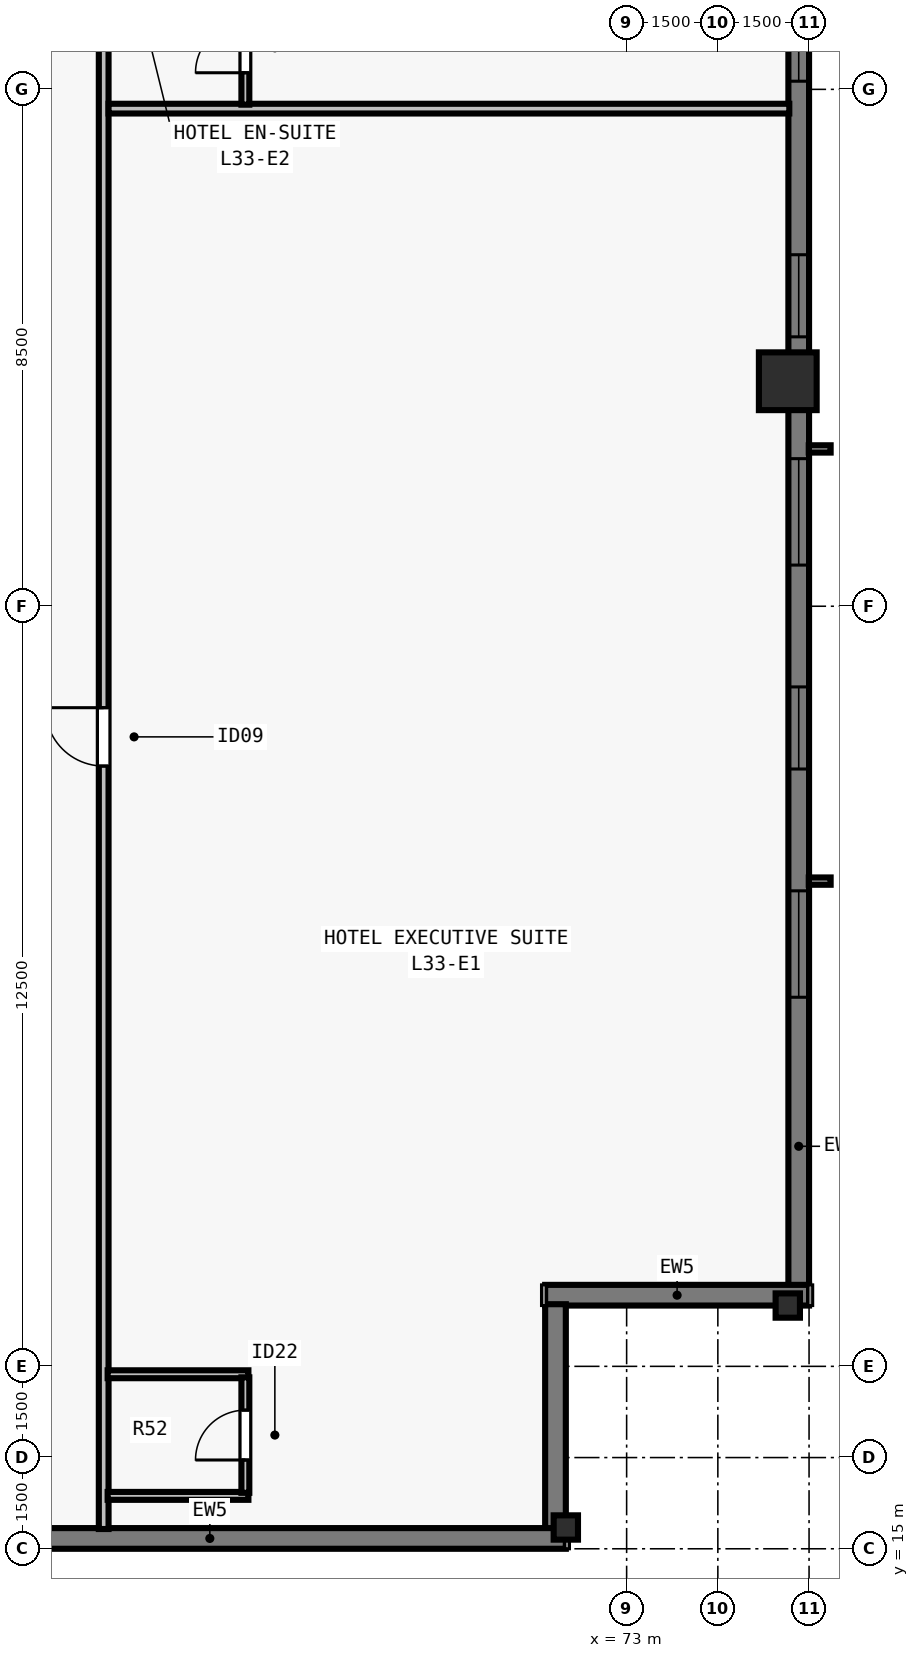
"""IFC4 building model, lengths in metres.
Left out: names, types, materials, properties, quantities, classifications, styles, units other than length and angle.
Written with IfcOpenShell. Run it as: python <this file> out.ifc"""

import sys

from ifc_helpers import new_model, si_unit, direction, frame, frame_2d, origin, origin_2d, place, context, subcontext, project, spatial, rectangle, i_section, extrude, element, fill, save


model = new_model("IFC4")
c1 = context("Model", 3, precision=1e-05, world=origin(), true_north=direction((0.0, 1.0)))
c2 = subcontext(c1, "Body", "Model", "MODEL_VIEW")
j1 = project(units=[si_unit("LENGTHUNIT", "METRE"), si_unit("PLANEANGLEUNIT", "RADIAN")], contexts=[c1])
p1 = place(None, origin())
s1 = spatial("IfcSite", under=j1, at=p1, CompositionType="ELEMENT")
p2 = place(p1, origin())
s2 = spatial("IfcBuilding", under=s1, at=p2, CompositionType="ELEMENT")
p3 = place(p2, frame((0.0, 0.0, 123.5)))
s3 = spatial("IfcBuildingStorey", under=s2, at=p3, CompositionType="ELEMENT", Elevation=123.5)
for number, where, z_axis, x_axis in (
    (1, (72.0, 15.35, 0.0), (0.0, 0.0, 1.0), (1.0, 0.0, 0.0)),
    (2, (75.65, 19.0, 0.0), (0.0, 0.0, 1.0), (0.0, 1.0, 0.0)),
):
    element("IfcColumn", number, at=place(p3, frame(where, z_axis=z_axis, x_axis=x_axis)), inside=s3, PredefinedType="COLUMN", context=c2, shape_type="SweptSolid", body=[
        extrude(i_section(OverallWidth=0.4, OverallDepth=0.4, WebThickness=0.022, FlangeThickness=0.036, at=origin_2d()), origin(), (0.0, 0.0, 1.0), 3.5),
    ])
p4 = place(p3, frame((75.65, 34.2, 0.0), z_axis=(0.0, 0.0, 1.0), x_axis=(0.0, 1.0, 0.0)))
e3 = element("IfcColumn", 3, at=p4, inside=s3, PredefinedType="COLUMN", context=c2, shape_type="SweptSolid", body=[
    extrude(rectangle(XDim=0.95, YDim=0.95, at=origin_2d()), origin(), (0.0, 0.0, 1.0), 3.5),
])
p5 = place(p3, frame((75.83, 59.0, 0.0), z_axis=(0.0, 0.0, 1.0), x_axis=(0.0, -1.0, 0.0)))
e4 = element("IfcWall", 4, at=p5, inside=s3, PredefinedType="SOLIDWALL", context=c2, shape_type="SweptSolid", body=[
    extrude(rectangle(XDim=39.682, YDim=0.34, at=frame_2d((19.841, 0.0))), origin(), (0.0, 0.0, 1.0), 3.28),
])
p6 = place(p5, frame((4.752, 0.0, 0.8)))
e5 = element("IfcOpeningElement", 5, at=p6, cuts=e4, PredefinedType="OPENING", context=c2, shape_type="SweptSolid", body=[
    extrude(rectangle(XDim=1.75, YDim=1.66, at=frame_2d((0.875, 0.83))), frame((0.0, 0.18, 0.0), z_axis=(0.0, -1.0, 0.0), x_axis=(1.0, 0.0, 0.0)), (0.0, 0.0, 1.0), 0.36),
])
p7 = place(p5, frame((8.505, 0.0, 0.8)))
e6 = element("IfcOpeningElement", 6, at=p7, cuts=e4, PredefinedType="OPENING", context=c2, shape_type="SweptSolid", body=[
    extrude(rectangle(XDim=1.35, YDim=1.66, at=frame_2d((0.675, 0.83))), frame((0.0, 0.18, 0.0), z_axis=(0.0, -1.0, 0.0), x_axis=(1.0, 0.0, 0.0)), (0.0, 0.0, 1.0), 0.36),
])
p8 = place(p5, frame((11.859, 0.0, 0.8)))
e7 = element("IfcOpeningElement", 7, at=p8, cuts=e4, PredefinedType="OPENING", context=c2, shape_type="SweptSolid", body=[
    extrude(rectangle(XDim=1.75, YDim=1.66, at=frame_2d((0.875, 0.83))), frame((0.0, 0.18, 0.0), z_axis=(0.0, -1.0, 0.0), x_axis=(1.0, 0.0, 0.0)), (0.0, 0.0, 1.0), 0.36),
])
p9 = place(p5, frame((16.062, 0.0, 0.8)))
e8 = element("IfcOpeningElement", 8, at=p9, cuts=e4, PredefinedType="OPENING", context=c2, shape_type="SweptSolid", body=[
    extrude(rectangle(XDim=1.35, YDim=1.66, at=frame_2d((0.675, 0.83))), frame((0.0, 0.18, 0.0), z_axis=(0.0, -1.0, 0.0), x_axis=(1.0, 0.0, 0.0)), (0.0, 0.0, 1.0), 0.36),
])
p10 = place(p5, frame((18.116, 0.0, 0.8)))
e9 = element("IfcOpeningElement", 9, at=p10, cuts=e4, PredefinedType="OPENING", context=c2, shape_type="SweptSolid", body=[
    extrude(rectangle(XDim=1.75, YDim=1.66, at=frame_2d((0.875, 0.83))), frame((0.0, 0.18, 0.0), z_axis=(0.0, -1.0, 0.0), x_axis=(1.0, 0.0, 0.0)), (0.0, 0.0, 1.0), 0.36),
])
p11 = place(p5, frame((22.719, 0.0, 0.8)))
e10 = element("IfcOpeningElement", 10, at=p11, cuts=e4, PredefinedType="OPENING", context=c2, shape_type="SweptSolid", body=[
    extrude(rectangle(XDim=1.35, YDim=1.66, at=frame_2d((0.675, 0.83))), frame((0.0, 0.18, 0.0), z_axis=(0.0, -1.0, 0.0), x_axis=(1.0, 0.0, 0.0)), (0.0, 0.0, 1.0), 0.36),
])
p12 = place(p5, frame((26.073, 0.0, 0.8)))
e11 = element("IfcOpeningElement", 11, at=p12, cuts=e4, PredefinedType="OPENING", context=c2, shape_type="SweptSolid", body=[
    extrude(rectangle(XDim=1.75, YDim=1.66, at=frame_2d((0.875, 0.83))), frame((0.0, 0.18, 0.0), z_axis=(0.0, -1.0, 0.0), x_axis=(1.0, 0.0, 0.0)), (0.0, 0.0, 1.0), 0.36),
])
p13 = place(p5, frame((29.827, 0.0, 0.8)))
e12 = element("IfcOpeningElement", 12, at=p13, cuts=e4, PredefinedType="OPENING", context=c2, shape_type="SweptSolid", body=[
    extrude(rectangle(XDim=1.35, YDim=1.66, at=frame_2d((0.675, 0.83))), frame((0.0, 0.18, 0.0), z_axis=(0.0, -1.0, 0.0), x_axis=(1.0, 0.0, 0.0)), (0.0, 0.0, 1.0), 0.36),
])
p14 = place(p5, frame((33.18, 0.0, 0.8)))
e13 = element("IfcOpeningElement", 13, at=p14, cuts=e4, PredefinedType="OPENING", context=c2, shape_type="SweptSolid", body=[
    extrude(rectangle(XDim=1.75, YDim=1.66, at=frame_2d((0.875, 0.83))), frame((0.0, 0.18, 0.0), z_axis=(0.0, -1.0, 0.0), x_axis=(1.0, 0.0, 0.0)), (0.0, 0.0, 1.0), 0.36),
])
p15 = place(p3, frame((76.0, 19.17, 0.0), z_axis=(0.0, 0.0, 1.0), x_axis=(-1.0, 0.0, 0.0)))
e14 = element("IfcWall", 14, at=p15, inside=s3, PredefinedType="SOLIDWALL", context=c2, shape_type="SweptSolid", body=[
    extrude(rectangle(XDim=4.34, YDim=0.34, at=frame_2d((2.17, 0.0))), origin(), (0.0, 0.0, 1.0), 3.28),
])
p16 = place(p3, frame((71.83, 19.022, 0.0), z_axis=(0.0, 0.0, 1.0), x_axis=(0.0, -1.0, 0.0)))
e15 = element("IfcWall", 15, at=p16, inside=s3, PredefinedType="SOLIDWALL", context=c2, shape_type="SweptSolid", body=[
    extrude(rectangle(XDim=3.704, YDim=0.34, at=frame_2d((1.852, 0.0))), origin(), (0.0, 0.0, 1.0), 3.28),
])
p17 = place(p3, frame((72.0, 15.17, 0.0), z_axis=(0.0, 0.0, 1.0), x_axis=(-1.0, 0.0, 0.0)))
e16 = element("IfcWall", 16, at=p17, inside=s3, PredefinedType="SOLIDWALL", context=c2, shape_type="SweptSolid", body=[
    extrude(rectangle(XDim=39.682, YDim=0.34, at=frame_2d((19.841, 0.0))), origin(), (0.0, 0.0, 1.0), 3.28),
])
p18 = place(p17, frame((11.859, 0.0, 0.8)))
e17 = element("IfcOpeningElement", 17, at=p18, cuts=e16, PredefinedType="OPENING", context=c2, shape_type="SweptSolid", body=[
    extrude(rectangle(XDim=1.75, YDim=1.66, at=frame_2d((0.875, 0.83))), frame((0.0, 0.18, 0.0), z_axis=(0.0, -1.0, 0.0), x_axis=(1.0, 0.0, 0.0)), (0.0, 0.0, 1.0), 0.36),
])
p19 = place(p17, frame((16.062, 0.0, 0.8)))
e18 = element("IfcOpeningElement", 18, at=p19, cuts=e16, PredefinedType="OPENING", context=c2, shape_type="SweptSolid", body=[
    extrude(rectangle(XDim=1.35, YDim=1.66, at=frame_2d((0.675, 0.83))), frame((0.0, 0.18, 0.0), z_axis=(0.0, -1.0, 0.0), x_axis=(1.0, 0.0, 0.0)), (0.0, 0.0, 1.0), 0.36),
])
p20 = place(p17, frame((18.966, 0.0, 0.8)))
e19 = element("IfcOpeningElement", 19, at=p20, cuts=e16, PredefinedType="OPENING", context=c2, shape_type="SweptSolid", body=[
    extrude(rectangle(XDim=1.75, YDim=1.66, at=frame_2d((0.875, 0.83))), frame((0.0, 0.18, 0.0), z_axis=(0.0, -1.0, 0.0), x_axis=(1.0, 0.0, 0.0)), (0.0, 0.0, 1.0), 0.36),
])
p21 = place(p17, frame((21.469, 0.0, 0.8)))
e20 = element("IfcOpeningElement", 20, at=p21, cuts=e16, PredefinedType="OPENING", context=c2, shape_type="SweptSolid", body=[
    extrude(rectangle(XDim=1.35, YDim=1.66, at=frame_2d((0.675, 0.83))), frame((0.0, 0.18, 0.0), z_axis=(0.0, -1.0, 0.0), x_axis=(1.0, 0.0, 0.0)), (0.0, 0.0, 1.0), 0.36),
])
p22 = place(p17, frame((27.323, 0.0, 0.8)))
e21 = element("IfcOpeningElement", 21, at=p22, cuts=e16, PredefinedType="OPENING", context=c2, shape_type="SweptSolid", body=[
    extrude(rectangle(XDim=1.75, YDim=1.66, at=frame_2d((0.875, 0.83))), frame((0.0, 0.18, 0.0), z_axis=(0.0, -1.0, 0.0), x_axis=(1.0, 0.0, 0.0)), (0.0, 0.0, 1.0), 0.36),
])
p23 = place(p17, frame((29.827, 0.0, 0.8)))
e22 = element("IfcOpeningElement", 22, at=p23, cuts=e16, PredefinedType="OPENING", context=c2, shape_type="SweptSolid", body=[
    extrude(rectangle(XDim=1.35, YDim=1.66, at=frame_2d((0.675, 0.83))), frame((0.0, 0.18, 0.0), z_axis=(0.0, -1.0, 0.0), x_axis=(1.0, 0.0, 0.0)), (0.0, 0.0, 1.0), 0.36),
])
p24 = place(p17, frame((25.43, 0.0, 0.8)))
e23 = element("IfcOpeningElement", 23, at=p24, cuts=e16, PredefinedType="OPENING", context=c2, shape_type="SweptSolid", body=[
    extrude(rectangle(XDim=0.9, YDim=1.66, at=frame_2d((0.45, 0.83))), frame((0.0, 0.18, 0.0), z_axis=(0.0, -1.0, 0.0), x_axis=(1.0, 0.0, 0.0)), (0.0, 0.0, 1.0), 0.36),
])
p25 = place(p17, frame((34.39, 0.0, 0.8)))
e24 = element("IfcOpeningElement", 24, at=p25, cuts=e16, PredefinedType="OPENING", context=c2, shape_type="SweptSolid", body=[
    extrude(rectangle(XDim=0.9, YDim=1.66, at=frame_2d((0.45, 0.83))), frame((0.0, 0.18, 0.0), z_axis=(0.0, -1.0, 0.0), x_axis=(1.0, 0.0, 0.0)), (0.0, 0.0, 1.0), 0.36),
])
p26 = place(p3, frame((64.4, 15.325, 0.0), z_axis=(0.0, 0.0, 1.0), x_axis=(0.0, 1.0, 0.0)))
e25 = element("IfcWall", 25, at=p26, inside=s3, PredefinedType="PARTITIONING", context=c2, shape_type="SweptSolid", body=[
    extrude(rectangle(XDim=47.35, YDim=0.16, at=frame_2d((23.675, 0.0))), origin(), (0.0, 0.0, 1.0), 2.555),
])
p27 = place(p26, frame((12.547, 0.0, 0.0)))
e26 = element("IfcOpeningElement", 26, at=p27, cuts=e25, PredefinedType="OPENING", context=c2, shape_type="SweptSolid", body=[
    extrude(rectangle(XDim=0.96, YDim=2.15, at=frame_2d((0.48, 1.075))), frame((0.0, 0.09, 0.0), z_axis=(0.0, -1.0, 0.0), x_axis=(1.0, 0.0, 0.0)), (0.0, 0.0, 1.0), 0.18),
])
p28 = place(p26, frame((35.902, 0.0, 0.0)))
e27 = element("IfcOpeningElement", 27, at=p28, cuts=e25, PredefinedType="OPENING", context=c2, shape_type="SweptSolid", body=[
    extrude(rectangle(XDim=0.96, YDim=2.15, at=frame_2d((0.48, 1.075))), frame((0.0, 0.09, 0.0), z_axis=(0.0, -1.0, 0.0), x_axis=(1.0, 0.0, 0.0)), (0.0, 0.0, 1.0), 0.18),
])
for number, where, z_axis, x_axis in (
    (28, (64.465, 15.87, 0.0), (0.0, 0.0, 1.0), (1.0, 0.0, 0.0)),
    (29, (64.465, 17.87, 0.0), (0.0, 0.0, 1.0), (1.0, 0.0, 0.0)),
):
    element("IfcWall", number, at=place(p3, frame(where, z_axis=z_axis, x_axis=x_axis)), inside=s3, PredefinedType="PLUMBINGWALL", context=c2, shape_type="SweptSolid", body=[
        extrude(rectangle(XDim=2.315, YDim=0.13, at=frame_2d((1.157, 0.0))), origin(), (0.0, 0.0, 1.0), 3.28),
    ])
p29 = place(p3, frame((66.73, 15.92, 0.0), z_axis=(0.0, 0.0, 1.0), x_axis=(0.0, 1.0, 0.0)))
e30 = element("IfcWall", 30, at=p29, inside=s3, PredefinedType="PLUMBINGWALL", context=c2, shape_type="SweptSolid", body=[
    extrude(rectangle(XDim=1.9, YDim=0.13, at=frame_2d((0.95, 0.0))), origin(), (0.0, 0.0, 1.0), 3.28),
])
p30 = place(p29, frame((0.54, 0.0, 0.0)))
e31 = element("IfcOpeningElement", 31, at=p30, cuts=e30, PredefinedType="OPENING", context=c2, shape_type="SweptSolid", body=[
    extrude(rectangle(XDim=0.82, YDim=2.1, at=frame_2d((0.41, 1.05))), frame((0.0, 0.075, 0.0), z_axis=(0.0, -1.0, 0.0), x_axis=(1.0, 0.0, 0.0)), (0.0, 0.0, 1.0), 0.15),
])
p31 = place(p3, frame((64.48, 38.683, 0.0), z_axis=(0.0, 0.0, 1.0), x_axis=(1.0, 0.0, 0.0)))
e32 = element("IfcWall", 32, at=p31, inside=s3, PredefinedType="PARTITIONING", context=c2, shape_type="SweptSolid", body=[
    extrude(rectangle(XDim=11.195, YDim=0.16, at=frame_2d((5.598, 0.0))), origin(), (0.0, 0.0, 1.0), 3.28),
])
p32 = place(p3, frame((66.73, 38.748, 0.0), z_axis=(0.0, 0.0, 1.0), x_axis=(0.0, 1.0, 0.0)))
e33 = element("IfcWall", 33, at=p32, inside=s3, PredefinedType="PLUMBINGWALL", context=c2, shape_type="SweptSolid", body=[
    extrude(rectangle(XDim=1.885, YDim=0.13, at=frame_2d((0.942, 0.0))), origin(), (0.0, 0.0, 1.0), 3.28),
])
p33 = place(p32, frame((0.525, 0.0, 0.0)))
e34 = element("IfcOpeningElement", 34, at=p33, cuts=e33, PredefinedType="OPENING", context=c2, shape_type="SweptSolid", body=[
    extrude(rectangle(XDim=0.82, YDim=2.1, at=frame_2d((0.41, 1.05))), frame((0.0, 0.075, 0.0), z_axis=(0.0, -1.0, 0.0), x_axis=(1.0, 0.0, 0.0)), (0.0, 0.0, 1.0), 0.15),
])
p34 = place(p10, origin())
e35 = element("IfcWindow", 35, at=p34, inside=s3, PartitioningType="SINGLE_PANEL", PredefinedType="WINDOW", context=c2, shape_type="SweptSolid", body=[
    extrude(rectangle(XDim=1.75, YDim=1.66, at=frame_2d((0.875, 0.83))), frame((0.0, -0.05, 0.0), z_axis=(0.0, -1.0, 0.0), x_axis=(1.0, 0.0, 0.0)), (0.0, 0.0, 1.0), 0.06),
])
fill(e9, e35)
p35 = place(p11, origin())
e36 = element("IfcWindow", 36, at=p35, inside=s3, PartitioningType="SINGLE_PANEL", PredefinedType="WINDOW", context=c2, shape_type="SweptSolid", body=[
    extrude(rectangle(XDim=1.35, YDim=1.66, at=frame_2d((0.675, 0.83))), frame((0.0, -0.05, 0.0), z_axis=(0.0, -1.0, 0.0), x_axis=(1.0, 0.0, 0.0)), (0.0, 0.0, 1.0), 0.06),
])
fill(e10, e36)
p36 = place(p12, origin())
e37 = element("IfcWindow", 37, at=p36, inside=s3, PartitioningType="SINGLE_PANEL", PredefinedType="WINDOW", context=c2, shape_type="SweptSolid", body=[
    extrude(rectangle(XDim=1.75, YDim=1.66, at=frame_2d((0.875, 0.83))), frame((0.0, -0.05, 0.0), z_axis=(0.0, -1.0, 0.0), x_axis=(1.0, 0.0, 0.0)), (0.0, 0.0, 1.0), 0.06),
])
fill(e11, e37)
p37 = place(p13, origin())
e38 = element("IfcWindow", 38, at=p37, inside=s3, PartitioningType="SINGLE_PANEL", PredefinedType="WINDOW", context=c2, shape_type="SweptSolid", body=[
    extrude(rectangle(XDim=1.35, YDim=1.66, at=frame_2d((0.675, 0.83))), frame((0.0, -0.05, 0.0), z_axis=(0.0, -1.0, 0.0), x_axis=(1.0, 0.0, 0.0)), (0.0, 0.0, 1.0), 0.06),
])
fill(e12, e38)
p38 = place(p14, origin())
e39 = element("IfcWindow", 39, at=p38, inside=s3, PartitioningType="SINGLE_PANEL", PredefinedType="WINDOW", context=c2, shape_type="SweptSolid", body=[
    extrude(rectangle(XDim=1.75, YDim=1.66, at=frame_2d((0.875, 0.83))), frame((0.0, -0.05, 0.0), z_axis=(0.0, -1.0, 0.0), x_axis=(1.0, 0.0, 0.0)), (0.0, 0.0, 1.0), 0.06),
])
fill(e13, e39)
p39 = place(p30, origin())
e40 = element("IfcDoor", 40, at=p39, inside=s3, OperationType="SINGLE_SWING_LEFT", PredefinedType="DOOR", context=c2, shape_type="SweptSolid", body=[
    extrude(rectangle(XDim=0.82, YDim=2.1, at=frame_2d((0.41, 1.05))), frame((0.0, 0.025, 0.0), z_axis=(0.0, -1.0, 0.0), x_axis=(1.0, 0.0, 0.0)), (0.0, 0.0, 1.0), 0.05),
])
fill(e31, e40)
p40 = place(p27, origin())
e41 = element("IfcDoor", 41, at=p40, inside=s3, OperationType="SINGLE_SWING_RIGHT", PredefinedType="DOOR", context=c2, shape_type="SweptSolid", body=[
    extrude(rectangle(XDim=0.96, YDim=2.15, at=frame_2d((0.48, 1.075))), frame((0.0, 0.025, 0.0), z_axis=(0.0, -1.0, 0.0), x_axis=(1.0, 0.0, 0.0)), (0.0, 0.0, 1.0), 0.05),
])
fill(e26, e41)
p41 = place(p33, origin())
e42 = element("IfcDoor", 42, at=p41, inside=s3, OperationType="SINGLE_SWING_LEFT", PredefinedType="DOOR", context=c2, shape_type="SweptSolid", body=[
    extrude(rectangle(XDim=0.82, YDim=2.1, at=frame_2d((0.41, 1.05))), frame((0.0, 0.025, 0.0), z_axis=(0.0, -1.0, 0.0), x_axis=(1.0, 0.0, 0.0)), (0.0, 0.0, 1.0), 0.05),
])
fill(e34, e42)
save(model, sys.argv[1])
